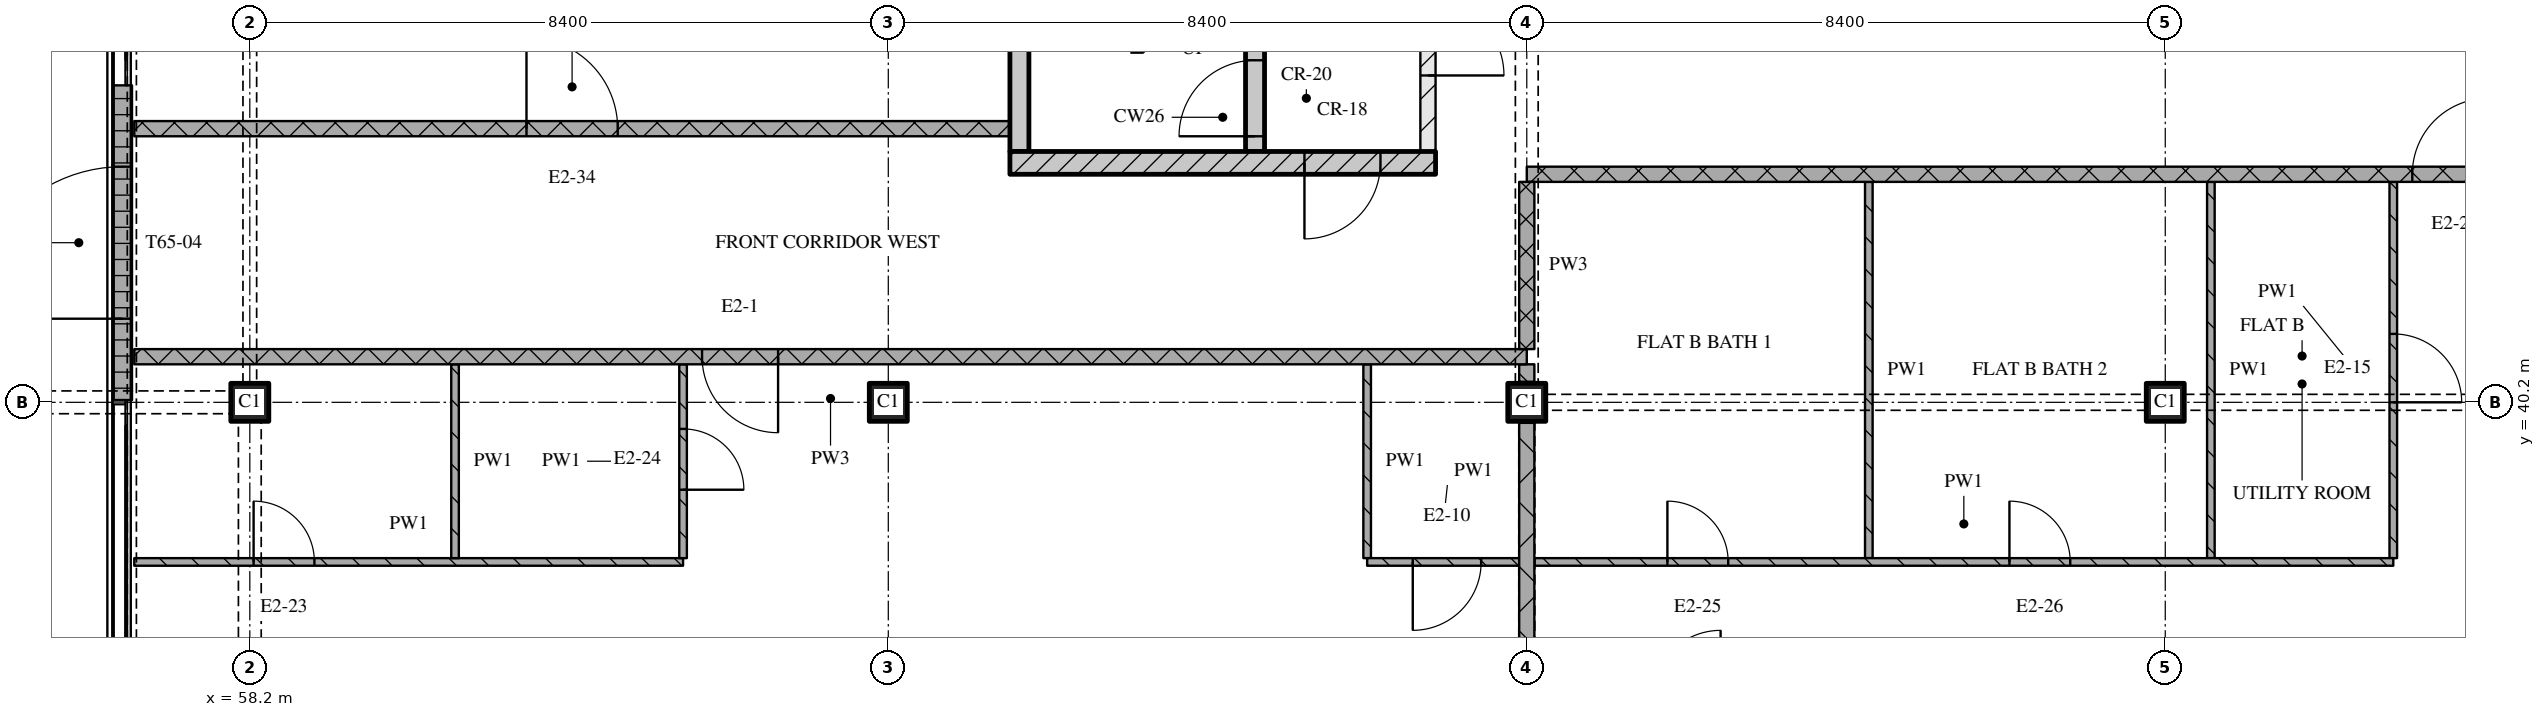
"""IFC4 building model, lengths in metres.
Left out: names, types, materials, properties, quantities, classifications, styles, units other than length and angle.
Written with IfcOpenShell. Run it as: python <this file> out.ifc"""

import sys

from ifc_helpers import new_model, si_unit, direction, frame, frame_2d, origin, origin_2d, place, context, subcontext, project, spatial, rectangle, extrude, element, fill, save


model = new_model("IFC4")
c1 = context("Model", 3, precision=1e-05, world=origin(), true_north=direction((0.0, 1.0)))
c2 = subcontext(c1, "Body", "Model", "MODEL_VIEW")
j1 = project(units=[si_unit("LENGTHUNIT", "METRE"), si_unit("PLANEANGLEUNIT", "RADIAN")], contexts=[c1])
p1 = place(None, origin())
s1 = spatial("IfcSite", under=j1, at=p1, CompositionType="ELEMENT")
p2 = place(p1, origin())
s2 = spatial("IfcBuilding", under=s1, at=p2, CompositionType="ELEMENT")
p3 = place(p2, frame((0.0, 0.0, 270.75)))
s3 = spatial("IfcBuildingStorey", under=s2, at=p3, CompositionType="ELEMENT", Elevation=270.75)
for number, where, z_axis, x_axis in (
    (1, (58.2, 40.2, 0.0), (0.0, 0.0, 1.0), (1.0, 0.0, 0.0)),
    (2, (66.6, 40.2, 0.0), (0.0, 0.0, 1.0), (1.0, 0.0, 0.0)),
    (3, (75.0, 40.2, 0.0), (0.0, 0.0, 1.0), (1.0, 0.0, 0.0)),
    (4, (83.4, 40.2, 0.0), (0.0, 0.0, 1.0), (1.0, 0.0, 0.0)),
):
    element("IfcColumn", number, at=place(p3, frame(where, z_axis=z_axis, x_axis=x_axis)), inside=s3, PredefinedType="COLUMN", context=c2, shape_type="SweptSolid", body=[
        extrude(rectangle(XDim=0.5, YDim=0.5, at=origin_2d()), origin(), (0.0, 0.0, 1.0), 3.6),
    ])
p4 = place(p3, frame((56.525, 40.23, 0.0), z_axis=(0.0, 0.0, 1.0), x_axis=(0.0, 1.0, 0.0)))
e5 = element("IfcWall", 5, at=p4, inside=s3, PredefinedType="SOLIDWALL", context=c2, shape_type="SweptSolid", body=[
    extrude(rectangle(XDim=4.14, YDim=0.25, at=frame_2d((2.07, 0.0))), origin(), (0.0, 0.0, 1.0), 3.32),
])
p5 = place(p4, frame((1.07, 0.0, 0.0)))
e6 = element("IfcOpeningElement", 6, at=p5, cuts=e5, PredefinedType="OPENING", context=c2, shape_type="SweptSolid", body=[
    extrude(rectangle(XDim=2.0, YDim=2.4, at=frame_2d((1.0, 1.2))), frame((0.0, 0.135, 0.0), z_axis=(0.0, -1.0, 0.0), x_axis=(1.0, 0.0, 0.0)), (0.0, 0.0, 1.0), 0.27),
])
p6 = place(p3, frame((68.2, 43.35, 0.0), z_axis=(0.0, 0.0, 1.0), x_axis=(1.0, 0.0, 0.0)))
e7 = element("IfcWall", 7, at=p6, inside=s3, PredefinedType="SOLIDWALL", context=c2, shape_type="SweptSolid", body=[
    extrude(rectangle(XDim=5.6, YDim=0.3, at=frame_2d((2.8, 0.0))), origin(), (0.0, 0.0, 1.0), 3.32),
])
p7 = place(p6, frame((3.875, 0.0, 0.0)))
e8 = element("IfcOpeningElement", 8, at=p7, cuts=e7, PredefinedType="OPENING", context=c2, shape_type="SweptSolid", body=[
    extrude(rectangle(XDim=1.0, YDim=2.1, at=frame_2d((0.5, 1.05))), frame((0.0, 0.16, 0.0), z_axis=(0.0, -1.0, 0.0), x_axis=(1.0, 0.0, 0.0)), (0.0, 0.0, 1.0), 0.32),
])
p8 = place(p3, frame((68.325, 43.5, 0.0), z_axis=(0.0, 0.0, 1.0), x_axis=(0.0, 1.0, 0.0)))
e9 = element("IfcWall", 9, at=p8, inside=s3, PredefinedType="SOLIDWALL", context=c2, shape_type="SweptSolid", body=[
    extrude(rectangle(XDim=6.9, YDim=0.25, at=frame_2d((3.45, 0.0))), origin(), (0.0, 0.0, 1.0), 3.32),
])
p9 = place(p3, frame((71.425, 43.5, 0.0), z_axis=(0.0, 0.0, 1.0), x_axis=(0.0, 1.0, 0.0)))
e10 = element("IfcWall", 10, at=p9, inside=s3, PredefinedType="SOLIDWALL", context=c2, shape_type="SweptSolid", body=[
    extrude(rectangle(XDim=6.9, YDim=0.25, at=frame_2d((3.45, 0.0))), origin(), (0.0, 0.0, 1.0), 3.32),
])
p10 = place(p9, frame((0.2, 0.0, 0.0)))
e11 = element("IfcOpeningElement", 11, at=p10, cuts=e10, PredefinedType="OPENING", context=c2, shape_type="SweptSolid", body=[
    extrude(rectangle(XDim=1.0, YDim=2.1, at=frame_2d((0.5, 1.05))), frame((0.0, 0.135, 0.0), z_axis=(0.0, -1.0, 0.0), x_axis=(1.0, 0.0, 0.0)), (0.0, 0.0, 1.0), 0.27),
])
p11 = place(p3, frame((73.7, 43.5, 0.0), z_axis=(0.0, 0.0, 1.0), x_axis=(0.0, 1.0, 0.0)))
e12 = element("IfcWall", 12, at=p11, inside=s3, PredefinedType="PARTITIONING", context=c2, shape_type="SweptSolid", body=[
    extrude(rectangle(XDim=6.9, YDim=0.2, at=frame_2d((3.45, 0.0))), origin(), (0.0, 0.0, 1.0), 3.32),
])
p12 = place(p11, frame((1.0, 0.0, 0.0)))
e13 = element("IfcOpeningElement", 13, at=p12, cuts=e12, PredefinedType="OPENING", context=c2, shape_type="SweptSolid", body=[
    extrude(rectangle(XDim=1.0, YDim=2.1, at=frame_2d((0.5, 1.05))), frame((0.0, 0.11, 0.0), z_axis=(0.0, -1.0, 0.0), x_axis=(1.0, 0.0, 0.0)), (0.0, 0.0, 1.0), 0.22),
])
p13 = place(p3, frame((56.68, 38.1, 0.0), z_axis=(0.0, 0.0, 1.0), x_axis=(1.0, 0.0, 0.0)))
e14 = element("IfcWall", 14, at=p13, inside=s3, PredefinedType="PARTITIONING", context=c2, shape_type="SweptSolid", body=[
    extrude(rectangle(XDim=7.22, YDim=0.1, at=frame_2d((3.61, 0.0))), origin(), (0.0, 0.0, 1.0), 3.32),
])
p14 = place(p13, frame((1.57, 0.0, 0.0)))
e15 = element("IfcOpeningElement", 15, at=p14, cuts=e14, PredefinedType="OPENING", context=c2, shape_type="SweptSolid", body=[
    extrude(rectangle(XDim=0.8, YDim=2.1, at=frame_2d((0.4, 1.05))), frame((0.0, 0.06, 0.0), z_axis=(0.0, -1.0, 0.0), x_axis=(1.0, 0.0, 0.0)), (0.0, 0.0, 1.0), 0.12),
])
p15 = place(p3, frame((75.0, 40.8, 0.0), z_axis=(0.0, 0.0, 1.0), x_axis=(-1.0, 0.0, 0.0)))
e16 = element("IfcWall", 16, at=p15, inside=s3, PredefinedType="PARTITIONING", context=c2, shape_type="SweptSolid", body=[
    extrude(rectangle(XDim=18.32, YDim=0.2, at=frame_2d((9.16, 0.0))), origin(), (0.0, 0.0, 1.0), 3.32),
])
p16 = place(p15, frame((9.85, 0.0, 0.0)))
e17 = element("IfcOpeningElement", 17, at=p16, cuts=e16, PredefinedType="OPENING", context=c2, shape_type="SweptSolid", body=[
    extrude(rectangle(XDim=1.0, YDim=2.1, at=frame_2d((0.5, 1.05))), frame((0.0, 0.11, 0.0), z_axis=(0.0, -1.0, 0.0), x_axis=(1.0, 0.0, 0.0)), (0.0, 0.0, 1.0), 0.22),
])
p17 = place(p3, frame((100.2, 43.2, 0.0), z_axis=(0.0, 0.0, 1.0), x_axis=(-1.0, 0.0, 0.0)))
e18 = element("IfcWall", 18, at=p17, inside=s3, PredefinedType="PARTITIONING", context=c2, shape_type="SweptSolid", body=[
    extrude(rectangle(XDim=25.2, YDim=0.2, at=frame_2d((12.6, 0.0))), origin(), (0.0, 0.0, 1.0), 3.32),
])
p18 = place(p17, frame((12.55, 0.0, 0.0)))
e19 = element("IfcOpeningElement", 19, at=p18, cuts=e18, PredefinedType="OPENING", context=c2, shape_type="SweptSolid", body=[
    extrude(rectangle(XDim=1.0, YDim=2.1, at=frame_2d((0.5, 1.05))), frame((0.0, 0.11, 0.0), z_axis=(0.0, -1.0, 0.0), x_axis=(1.0, 0.0, 0.0)), (0.0, 0.0, 1.0), 0.22),
])
p19 = place(p3, frame((56.68, 43.8, 0.0), z_axis=(0.0, 0.0, 1.0), x_axis=(1.0, 0.0, 0.0)))
e20 = element("IfcWall", 20, at=p19, inside=s3, PredefinedType="PARTITIONING", context=c2, shape_type="SweptSolid", body=[
    extrude(rectangle(XDim=11.52, YDim=0.2, at=frame_2d((5.76, 0.0))), origin(), (0.0, 0.0, 1.0), 3.32),
])
p20 = place(p19, frame((5.16, 0.0, 0.0)))
e21 = element("IfcOpeningElement", 21, at=p20, cuts=e20, PredefinedType="OPENING", context=c2, shape_type="SweptSolid", body=[
    extrude(rectangle(XDim=1.2, YDim=2.1, at=frame_2d((0.6, 1.05))), frame((0.0, 0.11, 0.0), z_axis=(0.0, -1.0, 0.0), x_axis=(1.0, 0.0, 0.0)), (0.0, 0.0, 1.0), 0.22),
])
p21 = place(p3, frame((60.9, 40.7, 0.0), z_axis=(0.0, 0.0, 1.0), x_axis=(0.0, -1.0, 0.0)))
e22 = element("IfcWall", 22, at=p21, inside=s3, PredefinedType="PARTITIONING", context=c2, shape_type="SweptSolid", body=[
    extrude(rectangle(XDim=2.55, YDim=0.1, at=frame_2d((1.275, 0.0))), origin(), (0.0, 0.0, 1.0), 3.32),
])
p22 = place(p3, frame((63.9, 38.15, 0.0), z_axis=(0.0, 0.0, 1.0), x_axis=(0.0, 1.0, 0.0)))
e23 = element("IfcWall", 23, at=p22, inside=s3, PredefinedType="PARTITIONING", context=c2, shape_type="SweptSolid", body=[
    extrude(rectangle(XDim=2.55, YDim=0.1, at=frame_2d((1.275, 0.0))), origin(), (0.0, 0.0, 1.0), 3.32),
])
p23 = place(p22, frame((0.9, 0.0, 0.0)))
e24 = element("IfcOpeningElement", 24, at=p23, cuts=e23, PredefinedType="OPENING", context=c2, shape_type="SweptSolid", body=[
    extrude(rectangle(XDim=0.8, YDim=2.1, at=frame_2d((0.4, 1.05))), frame((0.0, 0.06, 0.0), z_axis=(0.0, -1.0, 0.0), x_axis=(1.0, 0.0, 0.0)), (0.0, 0.0, 1.0), 0.12),
])
p24 = place(p3, frame((72.9, 40.7, 0.0), z_axis=(0.0, 0.0, 1.0), x_axis=(0.0, -1.0, 0.0)))
e25 = element("IfcWall", 25, at=p24, inside=s3, PredefinedType="PARTITIONING", context=c2, shape_type="SweptSolid", body=[
    extrude(rectangle(XDim=2.55, YDim=0.1, at=frame_2d((1.275, 0.0))), origin(), (0.0, 0.0, 1.0), 3.32),
])
p25 = place(p3, frame((75.0, 43.1, 0.0), z_axis=(0.0, 0.0, 1.0), x_axis=(0.0, -1.0, 0.0)))
e26 = element("IfcWall", 26, at=p25, inside=s3, PredefinedType="PARTITIONING", context=c2, shape_type="SweptSolid", body=[
    extrude(rectangle(XDim=2.2, YDim=0.2, at=frame_2d((1.1, 0.0))), origin(), (0.0, 0.0, 1.0), 2.53),
])
p26 = place(p3, frame((75.0, 39.93, 0.0), z_axis=(0.0, 0.0, 1.0), x_axis=(0.0, -1.0, 0.0)))
e27 = element("IfcWall", 27, at=p26, inside=s3, PredefinedType="PARTITIONING", context=c2, shape_type="SweptSolid", body=[
    extrude(rectangle(XDim=7.86, YDim=0.2, at=frame_2d((3.93, 0.0))), origin(), (0.0, 0.0, 1.0), 2.77),
])
p27 = place(p3, frame((75.0, 40.7, 0.0), z_axis=(0.0, 0.0, 1.0), x_axis=(0.0, -1.0, 0.0)))
e28 = element("IfcWall", 28, at=p27, inside=s3, PredefinedType="PARTITIONING", context=c2, shape_type="SweptSolid", body=[
    extrude(rectangle(XDim=0.23, YDim=0.2, at=frame_2d((0.115, 0.0))), origin(), (0.0, 0.0, 1.0), 3.32),
])
for number, where, z_axis, x_axis in (
    (29, (79.5, 43.1, 0.0), (0.0, 0.0, 1.0), (0.0, -1.0, 0.0)),
    (30, (84.0, 43.1, 0.0), (0.0, 0.0, 1.0), (0.0, -1.0, 0.0)),
):
    element("IfcWall", number, at=place(p3, frame(where, z_axis=z_axis, x_axis=x_axis)), inside=s3, PredefinedType="PARTITIONING", context=c2, shape_type="SweptSolid", body=[
        extrude(rectangle(XDim=4.95, YDim=0.1, at=frame_2d((2.475, 0.0))), origin(), (0.0, 0.0, 1.0), 3.32),
    ])
p28 = place(p3, frame((86.4, 38.15, 0.0), z_axis=(0.0, 0.0, 1.0), x_axis=(0.0, 1.0, 0.0)))
e31 = element("IfcWall", 31, at=p28, inside=s3, PredefinedType="PARTITIONING", context=c2, shape_type="SweptSolid", body=[
    extrude(rectangle(XDim=4.95, YDim=0.1, at=frame_2d((2.475, 0.0))), origin(), (0.0, 0.0, 1.0), 3.32),
])
p29 = place(p28, frame((2.05, 0.0, 0.0)))
e32 = element("IfcOpeningElement", 32, at=p29, cuts=e31, PredefinedType="OPENING", context=c2, shape_type="SweptSolid", body=[
    extrude(rectangle(XDim=0.9, YDim=2.1, at=frame_2d((0.45, 1.05))), frame((0.0, 0.06, 0.0), z_axis=(0.0, -1.0, 0.0), x_axis=(1.0, 0.0, 0.0)), (0.0, 0.0, 1.0), 0.12),
])
p30 = place(p3, frame((72.9, 38.1, 0.0), z_axis=(0.0, 0.0, 1.0), x_axis=(1.0, 0.0, 0.0)))
e33 = element("IfcWall", 33, at=p30, inside=s3, PredefinedType="PARTITIONING", context=c2, shape_type="SweptSolid", body=[
    extrude(rectangle(XDim=2.0, YDim=0.1, at=frame_2d((1.0, 0.0))), origin(), (0.0, 0.0, 1.0), 3.32),
])
p31 = place(p30, frame((0.6, 0.0, 0.0)))
e34 = element("IfcOpeningElement", 34, at=p31, cuts=e33, PredefinedType="OPENING", context=c2, shape_type="SweptSolid", body=[
    extrude(rectangle(XDim=0.9, YDim=2.1, at=frame_2d((0.45, 1.05))), frame((0.0, 0.06, 0.0), z_axis=(0.0, -1.0, 0.0), x_axis=(1.0, 0.0, 0.0)), (0.0, 0.0, 1.0), 0.12),
])
p32 = place(p3, frame((75.1, 38.1, 0.0), z_axis=(0.0, 0.0, 1.0), x_axis=(1.0, 0.0, 0.0)))
e35 = element("IfcWall", 35, at=p32, inside=s3, PredefinedType="PARTITIONING", context=c2, shape_type="SweptSolid", body=[
    extrude(rectangle(XDim=11.3, YDim=0.1, at=frame_2d((5.65, 0.0))), origin(), (0.0, 0.0, 1.0), 3.32),
])
p33 = place(p32, frame((1.75, 0.0, 0.0)))
e36 = element("IfcOpeningElement", 36, at=p33, cuts=e35, PredefinedType="OPENING", context=c2, shape_type="SweptSolid", body=[
    extrude(rectangle(XDim=0.8, YDim=2.1, at=frame_2d((0.4, 1.05))), frame((0.0, 0.06, 0.0), z_axis=(0.0, -1.0, 0.0), x_axis=(1.0, 0.0, 0.0)), (0.0, 0.0, 1.0), 0.12),
])
p34 = place(p32, frame((6.25, 0.0, 0.0)))
e37 = element("IfcOpeningElement", 37, at=p34, cuts=e35, PredefinedType="OPENING", context=c2, shape_type="SweptSolid", body=[
    extrude(rectangle(XDim=0.8, YDim=2.1, at=frame_2d((0.4, 1.05))), frame((0.0, 0.06, 0.0), z_axis=(0.0, -1.0, 0.0), x_axis=(1.0, 0.0, 0.0)), (0.0, 0.0, 1.0), 0.12),
])
p35 = place(p5, origin())
e38 = element("IfcDoor", 38, at=p35, inside=s3, OperationType="DOUBLE_DOOR_SINGLE_SWING", PredefinedType="DOOR", context=c2, shape_type="SweptSolid", body=[
    extrude(rectangle(XDim=2.0, YDim=2.4, at=frame_2d((1.0, 1.2))), frame((0.0, 0.025, 0.0), z_axis=(0.0, -1.0, 0.0), x_axis=(1.0, 0.0, 0.0)), (0.0, 0.0, 1.0), 0.05),
])
fill(e6, e38)
p36 = place(p7, origin())
e39 = element("IfcDoor", 39, at=p36, inside=s3, OperationType="SINGLE_SWING_RIGHT", PredefinedType="DOOR", context=c2, shape_type="SweptSolid", body=[
    extrude(rectangle(XDim=1.0, YDim=2.1, at=frame_2d((0.5, 1.05))), frame((0.0, 0.025, 0.0), z_axis=(0.0, -1.0, 0.0), x_axis=(1.0, 0.0, 0.0)), (0.0, 0.0, 1.0), 0.05),
])
fill(e8, e39)
p37 = place(p10, origin())
e40 = element("IfcDoor", 40, at=p37, inside=s3, OperationType="SINGLE_SWING_LEFT", PredefinedType="DOOR", context=c2, shape_type="SweptSolid", body=[
    extrude(rectangle(XDim=1.0, YDim=2.1, at=frame_2d((0.5, 1.05))), frame((0.0, 0.025, 0.0), z_axis=(0.0, -1.0, 0.0), x_axis=(1.0, 0.0, 0.0)), (0.0, 0.0, 1.0), 0.05),
])
fill(e11, e40)
p38 = place(p12, origin())
e41 = element("IfcDoor", 41, at=p38, inside=s3, OperationType="SINGLE_SWING_RIGHT", PredefinedType="DOOR", context=c2, shape_type="SweptSolid", body=[
    extrude(rectangle(XDim=1.0, YDim=2.1, at=frame_2d((0.5, 1.05))), frame((0.0, 0.025, 0.0), z_axis=(0.0, -1.0, 0.0), x_axis=(1.0, 0.0, 0.0)), (0.0, 0.0, 1.0), 0.05),
])
fill(e13, e41)
p39 = place(p14, origin())
e42 = element("IfcDoor", 42, at=p39, inside=s3, OperationType="SINGLE_SWING_LEFT", PredefinedType="DOOR", context=c2, shape_type="SweptSolid", body=[
    extrude(rectangle(XDim=0.8, YDim=2.1, at=frame_2d((0.4, 1.05))), frame((0.0, 0.025, 0.0), z_axis=(0.0, -1.0, 0.0), x_axis=(1.0, 0.0, 0.0)), (0.0, 0.0, 1.0), 0.05),
])
fill(e15, e42)
p40 = place(p16, origin())
e43 = element("IfcDoor", 43, at=p40, inside=s3, OperationType="SINGLE_SWING_LEFT", PredefinedType="DOOR", context=c2, shape_type="SweptSolid", body=[
    extrude(rectangle(XDim=1.0, YDim=2.1, at=frame_2d((0.5, 1.05))), frame((0.0, 0.025, 0.0), z_axis=(0.0, -1.0, 0.0), x_axis=(1.0, 0.0, 0.0)), (0.0, 0.0, 1.0), 0.05),
])
fill(e17, e43)
p41 = place(p18, origin())
e44 = element("IfcDoor", 44, at=p41, inside=s3, OperationType="SINGLE_SWING_RIGHT", PredefinedType="DOOR", context=c2, shape_type="SweptSolid", body=[
    extrude(rectangle(XDim=1.0, YDim=2.1, at=frame_2d((0.5, 1.05))), frame((0.0, 0.025, 0.0), z_axis=(0.0, -1.0, 0.0), x_axis=(1.0, 0.0, 0.0)), (0.0, 0.0, 1.0), 0.05),
])
fill(e19, e44)
p42 = place(p20, origin())
e45 = element("IfcDoor", 45, at=p42, inside=s3, OperationType="SINGLE_SWING_LEFT", PredefinedType="DOOR", context=c2, shape_type="SweptSolid", body=[
    extrude(rectangle(XDim=1.2, YDim=2.1, at=frame_2d((0.6, 1.05))), frame((0.0, 0.025, 0.0), z_axis=(0.0, -1.0, 0.0), x_axis=(1.0, 0.0, 0.0)), (0.0, 0.0, 1.0), 0.05),
])
fill(e21, e45)
p43 = place(p23, origin())
e46 = element("IfcDoor", 46, at=p43, inside=s3, OperationType="SINGLE_SWING_RIGHT", PredefinedType="DOOR", context=c2, shape_type="SweptSolid", body=[
    extrude(rectangle(XDim=0.8, YDim=2.1, at=frame_2d((0.4, 1.05))), frame((0.0, 0.025, 0.0), z_axis=(0.0, -1.0, 0.0), x_axis=(1.0, 0.0, 0.0)), (0.0, 0.0, 1.0), 0.05),
])
fill(e24, e46)
p44 = place(p29, origin())
e47 = element("IfcDoor", 47, at=p44, inside=s3, OperationType="SINGLE_SWING_RIGHT", PredefinedType="DOOR", context=c2, shape_type="SweptSolid", body=[
    extrude(rectangle(XDim=0.9, YDim=2.1, at=frame_2d((0.45, 1.05))), frame((0.0, 0.025, 0.0), z_axis=(0.0, -1.0, 0.0), x_axis=(1.0, 0.0, 0.0)), (0.0, 0.0, 1.0), 0.05),
])
fill(e32, e47)
p45 = place(p31, origin())
e48 = element("IfcDoor", 48, at=p45, inside=s3, OperationType="SINGLE_SWING_RIGHT", PredefinedType="DOOR", context=c2, shape_type="SweptSolid", body=[
    extrude(rectangle(XDim=0.9, YDim=2.1, at=frame_2d((0.45, 1.05))), frame((0.0, 0.025, 0.0), z_axis=(0.0, -1.0, 0.0), x_axis=(1.0, 0.0, 0.0)), (0.0, 0.0, 1.0), 0.05),
])
fill(e34, e48)
p46 = place(p33, origin())
e49 = element("IfcDoor", 49, at=p46, inside=s3, OperationType="SINGLE_SWING_LEFT", PredefinedType="DOOR", context=c2, shape_type="SweptSolid", body=[
    extrude(rectangle(XDim=0.8, YDim=2.1, at=frame_2d((0.4, 1.05))), frame((0.0, 0.025, 0.0), z_axis=(0.0, -1.0, 0.0), x_axis=(1.0, 0.0, 0.0)), (0.0, 0.0, 1.0), 0.05),
])
fill(e36, e49)
p47 = place(p34, origin())
e50 = element("IfcDoor", 50, at=p47, inside=s3, OperationType="SINGLE_SWING_LEFT", PredefinedType="DOOR", context=c2, shape_type="SweptSolid", body=[
    extrude(rectangle(XDim=0.8, YDim=2.1, at=frame_2d((0.4, 1.05))), frame((0.0, 0.025, 0.0), z_axis=(0.0, -1.0, 0.0), x_axis=(1.0, 0.0, 0.0)), (0.0, 0.0, 1.0), 0.05),
])
fill(e37, e50)
save(model, sys.argv[1])
